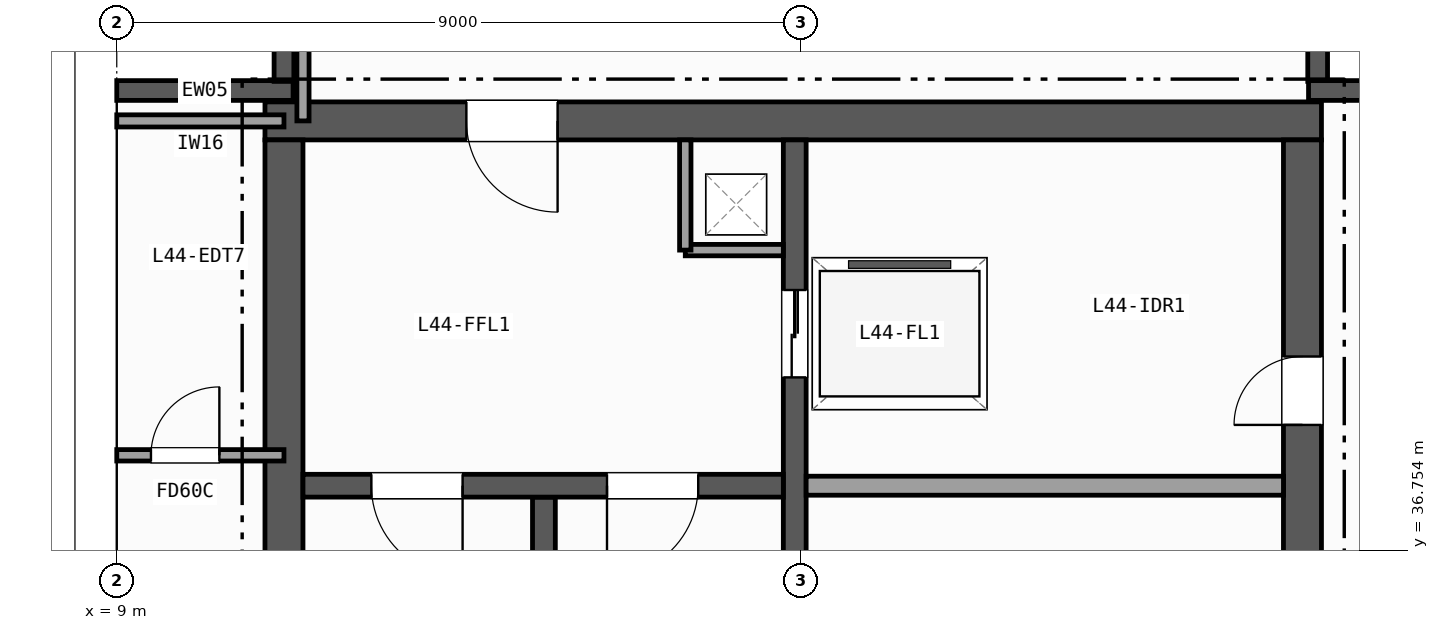
"""IFC4 building model, lengths in metres.
Left out: names, types, materials, properties, quantities, classifications, styles, units other than length and angle.
Written with IfcOpenShell. Run it as: python <this file> out.ifc"""

import sys

from ifc_helpers import new_model, si_unit, direction, frame, frame_2d, origin, place, context, subcontext, project, spatial, rectangle, extrude, element, fill, save


model = new_model("IFC4")
c1 = context("Model", 3, precision=1e-05, world=origin(), true_north=direction((0.0, 1.0)))
c2 = subcontext(c1, "Body", "Model", "MODEL_VIEW")
j1 = project(units=[si_unit("LENGTHUNIT", "METRE"), si_unit("PLANEANGLEUNIT", "RADIAN")], contexts=[c1])
p1 = place(None, origin())
s1 = spatial("IfcSite", under=j1, at=p1, CompositionType="ELEMENT")
p2 = place(p1, origin())
s2 = spatial("IfcBuilding", under=s1, at=p2, CompositionType="ELEMENT")
p3 = place(p2, frame((0.0, 0.0, 177.9)))
s3 = spatial("IfcBuildingStorey", under=s2, at=p3, CompositionType="ELEMENT", Elevation=177.9)
p4 = place(p3, frame((9.0, 42.8, 0.0), z_axis=(0.0, 0.0, 1.0), x_axis=(1.0, 0.0, 0.0)))
e1 = element("IfcWall", 1, at=p4, inside=s3, PredefinedType="SOLIDWALL", context=c2, shape_type="SweptSolid", body=[
    extrude(rectangle(XDim=2.32, YDim=0.26, at=frame_2d((1.16, 0.0))), origin(), (0.0, 0.0, 1.0), 3.42),
])
for number, where, z_axis, x_axis in (
    (2, (11.2, 42.92, 0.0), (0.0, 0.0, 1.0), (0.0, 1.0, 0.0)),
    (3, (24.8, 45.0, 0.0), (0.0, 0.0, 1.0), (0.0, -1.0, 0.0)),
):
    element("IfcWall", number, at=place(p3, frame(where, z_axis=z_axis, x_axis=x_axis)), inside=s3, PredefinedType="SOLIDWALL", context=c2, shape_type="SweptSolid", body=[
        extrude(rectangle(XDim=2.08, YDim=0.26, at=frame_2d((1.04, 0.0))), origin(), (0.0, 0.0, 1.0), 3.42),
    ])
p5 = place(p3, frame((24.68, 42.8, 0.0), z_axis=(0.0, 0.0, 1.0), x_axis=(1.0, 0.0, 0.0)))
e4 = element("IfcWall", 4, at=p5, inside=s3, PredefinedType="SOLIDWALL", context=c2, shape_type="SweptSolid", body=[
    extrude(rectangle(XDim=2.32, YDim=0.26, at=frame_2d((1.16, 0.0))), origin(), (0.0, 0.0, 1.0), 3.42),
])
p6 = place(p3, frame((24.85, 42.4, 0.0), z_axis=(0.0, 0.0, 1.0), x_axis=(-1.0, 0.0, 0.0)))
e5 = element("IfcWall", 5, at=p6, inside=s3, PredefinedType="SHEAR", context=c2, shape_type="SweptSolid", body=[
    extrude(rectangle(XDim=13.9, YDim=0.5, at=frame_2d((6.95, 0.0))), origin(), (0.0, 0.0, 1.0), 3.42),
])
p7 = place(p6, frame((10.05, 0.0, 0.0)))
e6 = element("IfcOpeningElement", 6, at=p7, cuts=e5, PredefinedType="OPENING", context=c2, shape_type="SweptSolid", body=[
    extrude(rectangle(XDim=1.2, YDim=2.15, at=frame_2d((0.6, 1.075))), frame((0.0, 0.26, 0.0), z_axis=(0.0, -1.0, 0.0), x_axis=(1.0, 0.0, 0.0)), (0.0, 0.0, 1.0), 0.52),
])
p8 = place(p3, frame((11.2, 42.15, 0.0), z_axis=(0.0, 0.0, 1.0), x_axis=(0.0, -1.0, 0.0)))
e7 = element("IfcWall", 7, at=p8, inside=s3, PredefinedType="SHEAR", context=c2, shape_type="SweptSolid", body=[
    extrude(rectangle(XDim=13.7, YDim=0.5, at=frame_2d((6.85, 0.0))), origin(), (0.0, 0.0, 1.0), 3.42),
])
p9 = place(p3, frame((24.6, 28.45, 0.0), z_axis=(0.0, 0.0, 1.0), x_axis=(0.0, 1.0, 0.0)))
e8 = element("IfcWall", 8, at=p9, inside=s3, PredefinedType="SHEAR", context=c2, shape_type="SweptSolid", body=[
    extrude(rectangle(XDim=13.7, YDim=0.5, at=frame_2d((6.85, 0.0))), origin(), (0.0, 0.0, 1.0), 3.42),
])
p10 = place(p9, frame((3.35, 0.0, 0.0)))
e9 = element("IfcOpeningElement", 9, at=p10, cuts=e8, PredefinedType="OPENING", context=c2, shape_type="SweptSolid", body=[
    extrude(rectangle(XDim=1.5, YDim=2.2, at=frame_2d((0.75, 1.1))), frame((0.0, 0.26, 0.0), z_axis=(0.0, -1.0, 0.0), x_axis=(1.0, 0.0, 0.0)), (0.0, 0.0, 1.0), 0.52),
])
p11 = place(p9, frame((9.95, 0.0, 0.0)))
e10 = element("IfcOpeningElement", 10, at=p11, cuts=e8, PredefinedType="OPENING", context=c2, shape_type="SweptSolid", body=[
    extrude(rectangle(XDim=0.9, YDim=2.1, at=frame_2d((0.45, 1.05))), frame((0.0, 0.26, 0.0), z_axis=(0.0, -1.0, 0.0), x_axis=(1.0, 0.0, 0.0)), (0.0, 0.0, 1.0), 0.52),
])
p12 = place(p3, frame((14.62, 28.45, 0.0), z_axis=(0.0, 0.0, 1.0), x_axis=(0.0, 1.0, 0.0)))
e11 = element("IfcWall", 11, at=p12, inside=s3, PredefinedType="SHEAR", context=c2, shape_type="SweptSolid", body=[
    extrude(rectangle(XDim=9.0, YDim=0.3, at=frame_2d((4.5, 0.0))), origin(), (0.0, 0.0, 1.0), 3.42),
])
p13 = place(p3, frame((17.92, 42.15, 0.0), z_axis=(0.0, 0.0, 1.0), x_axis=(0.0, -1.0, 0.0)))
e12 = element("IfcWall", 12, at=p13, inside=s3, PredefinedType="SHEAR", context=c2, shape_type="SweptSolid", body=[
    extrude(rectangle(XDim=13.7, YDim=0.3, at=frame_2d((6.85, 0.0))), origin(), (0.0, 0.0, 1.0), 3.42),
])
p14 = place(p13, frame((1.975, 0.0, 0.0)))
e13 = element("IfcOpeningElement", 13, at=p14, cuts=e12, PredefinedType="OPENING", context=c2, shape_type="SweptSolid", body=[
    extrude(rectangle(XDim=1.15, YDim=2.15, at=frame_2d((0.575, 1.075))), frame((0.0, 0.16, 0.0), z_axis=(0.0, -1.0, 0.0), x_axis=(1.0, 0.0, 0.0)), (0.0, 0.0, 1.0), 0.32),
])
p15 = place(p3, frame((17.77, 37.6, 0.0), z_axis=(0.0, 0.0, 1.0), x_axis=(-1.0, 0.0, 0.0)))
e14 = element("IfcWall", 14, at=p15, inside=s3, PredefinedType="SHEAR", context=c2, shape_type="SweptSolid", body=[
    extrude(rectangle(XDim=6.32, YDim=0.3, at=frame_2d((3.16, 0.0))), origin(), (0.0, 0.0, 1.0), 3.42),
])
p16 = place(p15, frame((4.22, 0.0, 0.0)))
e15 = element("IfcOpeningElement", 15, at=p16, cuts=e14, PredefinedType="OPENING", context=c2, shape_type="SweptSolid", body=[
    extrude(rectangle(XDim=1.2, YDim=2.15, at=frame_2d((0.6, 1.075))), frame((0.0, 0.16, 0.0), z_axis=(0.0, -1.0, 0.0), x_axis=(1.0, 0.0, 0.0)), (0.0, 0.0, 1.0), 0.32),
])
p17 = place(p15, frame((1.12, 0.0, 0.0)))
e16 = element("IfcOpeningElement", 16, at=p17, cuts=e14, PredefinedType="OPENING", context=c2, shape_type="SweptSolid", body=[
    extrude(rectangle(XDim=1.2, YDim=2.15, at=frame_2d((0.6, 1.075))), frame((0.0, 0.16, 0.0), z_axis=(0.0, -1.0, 0.0), x_axis=(1.0, 0.0, 0.0)), (0.0, 0.0, 1.0), 0.32),
])
p18 = place(p3, frame((16.48, 40.7, 0.0), z_axis=(0.0, 0.0, 1.0), x_axis=(1.0, 0.0, 0.0)))
e17 = element("IfcWall", 17, at=p18, inside=s3, PredefinedType="PARTITIONING", context=c2, shape_type="SweptSolid", body=[
    extrude(rectangle(XDim=1.29, YDim=0.15, at=frame_2d((0.645, 0.0))), origin(), (0.0, 0.0, 1.0), 3.42),
])
p19 = place(p3, frame((16.48, 40.7, 0.0), z_axis=(0.0, 0.0, 1.0), x_axis=(0.0, 1.0, 0.0)))
e18 = element("IfcWall", 18, at=p19, inside=s3, PredefinedType="PARTITIONING", context=c2, shape_type="SweptSolid", body=[
    extrude(rectangle(XDim=1.45, YDim=0.15, at=frame_2d((0.725, 0.0))), origin(), (0.0, 0.0, 1.0), 3.42),
])
p20 = place(p3, frame((18.07, 37.6, 0.0), z_axis=(0.0, 0.0, 1.0), x_axis=(1.0, 0.0, 0.0)))
e19 = element("IfcWall", 19, at=p20, inside=s3, PredefinedType="PARTITIONING", context=c2, shape_type="SweptSolid", body=[
    extrude(rectangle(XDim=6.28, YDim=0.25, at=frame_2d((3.14, 0.0))), origin(), (0.0, 0.0, 1.0), 3.42),
])
p21 = place(p3, frame((9.0, 42.4, 0.0), z_axis=(0.0, 0.0, 1.0), x_axis=(1.0, 0.0, 0.0)))
e20 = element("IfcWall", 20, at=p21, inside=s3, PredefinedType="PARTITIONING", context=c2, shape_type="SweptSolid", body=[
    extrude(rectangle(XDim=2.2, YDim=0.16, at=frame_2d((1.1, 0.0))), origin(), (0.0, 0.0, 1.0), 3.42),
])
p22 = place(p3, frame((11.45, 42.4, 0.0), z_axis=(0.0, 0.0, 1.0), x_axis=(0.0, 1.0, 0.0)))
e21 = element("IfcWall", 21, at=p22, inside=s3, PredefinedType="PARTITIONING", context=c2, shape_type="SweptSolid", body=[
    extrude(rectangle(XDim=2.666, YDim=0.16, at=frame_2d((1.333, 0.0))), origin(), (0.0, 0.0, 1.0), 3.42),
])
p23 = place(p3, frame((9.0, 38.0, 0.0), z_axis=(0.0, 0.0, 1.0), x_axis=(1.0, 0.0, 0.0)))
e22 = element("IfcWall", 22, at=p23, inside=s3, PredefinedType="PARTITIONING", context=c2, shape_type="SweptSolid", body=[
    extrude(rectangle(XDim=2.2, YDim=0.15, at=frame_2d((1.1, 0.0))), origin(), (0.0, 0.0, 1.0), 3.42),
])
p24 = place(p23, frame((0.45, 0.0, 0.0)))
e23 = element("IfcOpeningElement", 23, at=p24, cuts=e22, PredefinedType="OPENING", context=c2, shape_type="SweptSolid", body=[
    extrude(rectangle(XDim=0.9, YDim=2.1, at=frame_2d((0.45, 1.05))), frame((0.0, 0.085, 0.0), z_axis=(0.0, -1.0, 0.0), x_axis=(1.0, 0.0, 0.0)), (0.0, 0.0, 1.0), 0.17),
])
p25 = place(p16, origin())
e24 = element("IfcDoor", 24, at=p25, inside=s3, OperationType="SINGLE_SWING_LEFT", PredefinedType="DOOR", context=c2, shape_type="SweptSolid", body=[
    extrude(rectangle(XDim=1.2, YDim=2.15, at=frame_2d((0.6, 1.075))), frame((0.0, 0.025, 0.0), z_axis=(0.0, -1.0, 0.0), x_axis=(1.0, 0.0, 0.0)), (0.0, 0.0, 1.0), 0.05),
])
fill(e15, e24)
p26 = place(p17, origin())
e25 = element("IfcDoor", 25, at=p26, inside=s3, OperationType="SINGLE_SWING_RIGHT", PredefinedType="DOOR", context=c2, shape_type="SweptSolid", body=[
    extrude(rectangle(XDim=1.2, YDim=2.15, at=frame_2d((0.6, 1.075))), frame((0.0, 0.025, 0.0), z_axis=(0.0, -1.0, 0.0), x_axis=(1.0, 0.0, 0.0)), (0.0, 0.0, 1.0), 0.05),
])
fill(e16, e25)
p27 = place(p7, origin())
e26 = element("IfcDoor", 26, at=p27, inside=s3, OperationType="SINGLE_SWING_LEFT", PredefinedType="DOOR", context=c2, shape_type="SweptSolid", body=[
    extrude(rectangle(XDim=1.2, YDim=2.15, at=frame_2d((0.6, 1.075))), frame((0.0, 0.025, 0.0), z_axis=(0.0, -1.0, 0.0), x_axis=(1.0, 0.0, 0.0)), (0.0, 0.0, 1.0), 0.05),
])
fill(e6, e26)
p28 = place(p11, origin())
e27 = element("IfcDoor", 27, at=p28, inside=s3, OperationType="SINGLE_SWING_LEFT", PredefinedType="DOOR", context=c2, shape_type="SweptSolid", body=[
    extrude(rectangle(XDim=0.9, YDim=2.1, at=frame_2d((0.45, 1.05))), frame((0.0, 0.025, 0.0), z_axis=(0.0, -1.0, 0.0), x_axis=(1.0, 0.0, 0.0)), (0.0, 0.0, 1.0), 0.05),
])
fill(e10, e27)
p29 = place(p14, origin())
e28 = element("IfcDoor", 28, at=p29, inside=s3, OperationType="DOUBLE_DOOR_SLIDING", PredefinedType="DOOR", context=c2, shape_type="SweptSolid", body=[
    extrude(rectangle(XDim=1.15, YDim=2.15, at=frame_2d((0.575, 1.075))), frame((0.0, 0.025, 0.0), z_axis=(0.0, -1.0, 0.0), x_axis=(1.0, 0.0, 0.0)), (0.0, 0.0, 1.0), 0.05),
])
fill(e13, e28)
p30 = place(p24, origin())
e29 = element("IfcDoor", 29, at=p30, inside=s3, OperationType="SINGLE_SWING_RIGHT", PredefinedType="DOOR", context=c2, shape_type="SweptSolid", body=[
    extrude(rectangle(XDim=0.9, YDim=2.1, at=frame_2d((0.45, 1.05))), frame((0.0, 0.025, 0.0), z_axis=(0.0, -1.0, 0.0), x_axis=(1.0, 0.0, 0.0)), (0.0, 0.0, 1.0), 0.05),
])
fill(e23, e29)
save(model, sys.argv[1])
